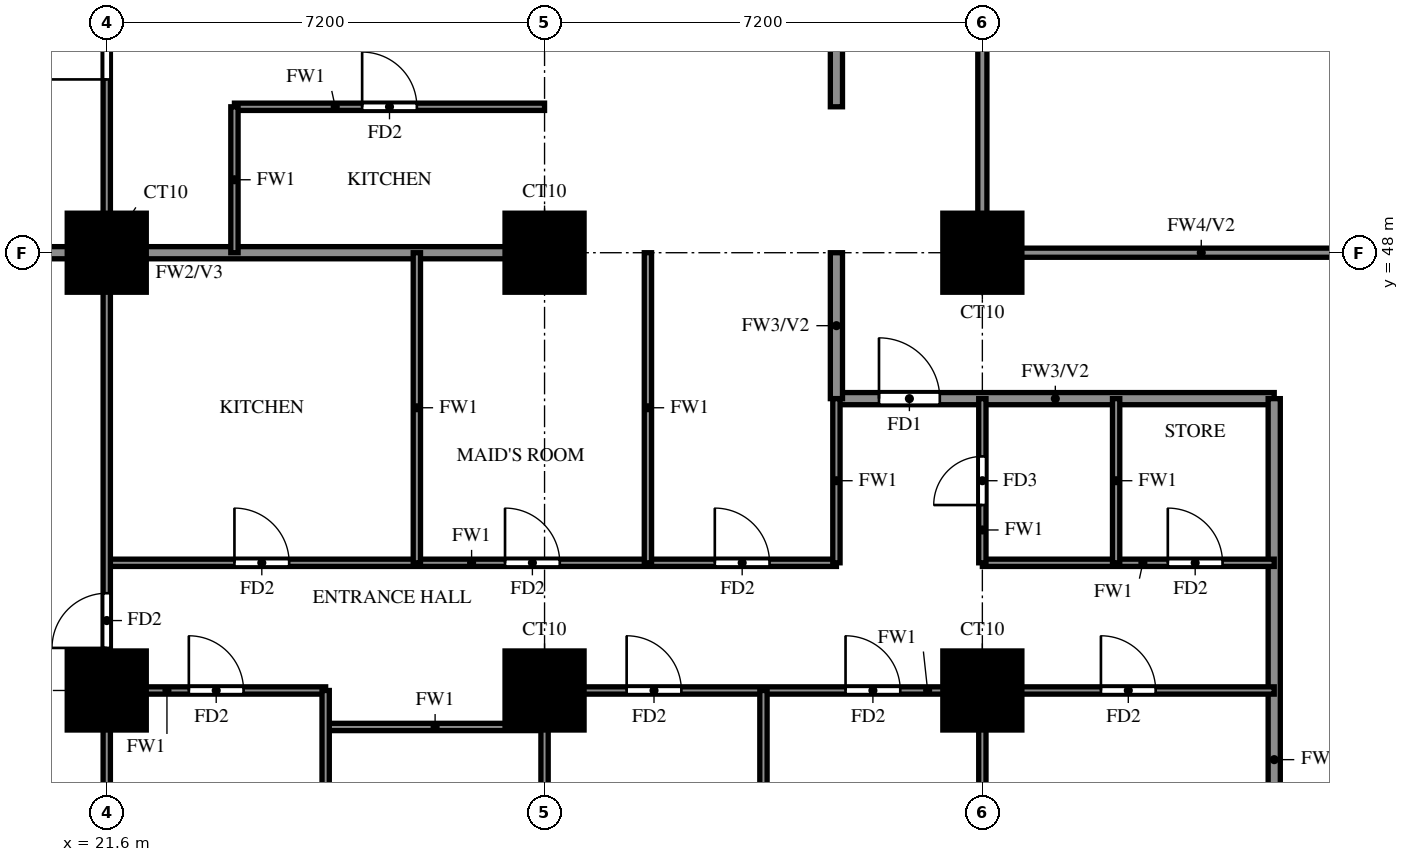
"""IFC4 building model, lengths in metres.
Left out: names, types, materials, properties, quantities, classifications, styles, units other than length and angle.
Written with IfcOpenShell. Run it as: python <this file> out.ifc"""

import sys

from ifc_helpers import new_model, si_unit, direction, frame, frame_2d, origin, origin_2d, place, context, subcontext, project, spatial, rectangle, extrude, source, transform, mapped, element, fill, save


model = new_model("IFC4")
c1 = context("Model", 3, precision=1e-05, world=origin(), true_north=direction((0.0, 1.0)))
c2 = subcontext(c1, "Body", "Model", "MODEL_VIEW")
j1 = project(units=[si_unit("LENGTHUNIT", "METRE"), si_unit("PLANEANGLEUNIT", "RADIAN")], contexts=[c1])
p1 = place(None, origin())
s1 = spatial("IfcSite", under=j1, at=p1, CompositionType="ELEMENT")
p2 = place(p1, origin())
s2 = spatial("IfcBuilding", under=s1, at=p2, CompositionType="ELEMENT")
p3 = place(p2, frame((0.0, 0.0, 79.5)))
s3 = spatial("IfcBuildingStorey", under=s2, at=p3, CompositionType="ELEMENT", Elevation=79.5)
m1 = source(origin(), c2, "Body", "SweptSolid", [
    extrude(rectangle(XDim=1.3, YDim=1.3, at=origin_2d()), origin(), (0.0, 0.0, 1.0), 3.18),
])
for number, where, z_axis, x_axis in (
    (1, (21.6, 40.8, 0.0), (0.0, 0.0, 1.0), (1.0, 0.0, 0.0)),
    (2, (28.8, 40.8, 0.0), (0.0, 0.0, 1.0), (1.0, 0.0, 0.0)),
    (3, (36.0, 40.8, 0.0), (0.0, 0.0, 1.0), (1.0, 0.0, 0.0)),
    (4, (21.6, 48.0, 0.0), (0.0, 0.0, 1.0), (1.0, 0.0, 0.0)),
    (5, (28.8, 48.0, 0.0), (0.0, 0.0, 1.0), (1.0, 0.0, 0.0)),
    (6, (36.0, 48.0, 0.0), (0.0, 0.0, 1.0), (1.0, 0.0, 0.0)),
):
    element("IfcColumn", number, at=place(p3, frame(where, z_axis=z_axis, x_axis=x_axis)), inside=s3, PredefinedType="COLUMN", context=c2, shape_type="MappedRepresentation", body=[
        mapped(m1, transform((0.0, 0.0, 0.0))),
    ])
p4 = place(p3, frame((33.6, 45.6, 0.0), z_axis=(0.0, 0.0, 1.0), x_axis=(1.0, 0.0, 0.0)))
e7 = element("IfcWall", 7, at=p4, inside=s3, PredefinedType="SOLIDWALL", context=c2, shape_type="SweptSolid", body=[
    extrude(rectangle(XDim=7.2, YDim=0.2, at=frame_2d((3.6, 0.0))), origin(), (0.0, 0.0, 1.0), 3.18),
])
p5 = place(p4, frame((0.7, 0.0, 0.0)))
e8 = element("IfcOpeningElement", 8, at=p5, cuts=e7, PredefinedType="OPENING", context=c2, shape_type="SweptSolid", body=[
    extrude(rectangle(XDim=1.0, YDim=2.1, at=frame_2d((0.5, 1.05))), frame((0.0, 0.11, 0.0), z_axis=(0.0, -1.0, 0.0), x_axis=(1.0, 0.0, 0.0)), (0.0, 0.0, 1.0), 0.22),
])
p6 = place(p3, frame((33.6, 45.6, 0.0), z_axis=(0.0, 0.0, 1.0), x_axis=(0.0, 1.0, 0.0)))
e9 = element("IfcWall", 9, at=p6, inside=s3, PredefinedType="SOLIDWALL", context=c2, shape_type="SweptSolid", body=[
    extrude(rectangle(XDim=2.4, YDim=0.2, at=frame_2d((1.2, 0.0))), origin(), (0.0, 0.0, 1.0), 3.18),
])
p7 = place(p3, frame((33.6, 50.4, 0.0), z_axis=(0.0, 0.0, 1.0), x_axis=(0.0, 1.0, 0.0)))
e10 = element("IfcWall", 10, at=p7, inside=s3, PredefinedType="SOLIDWALL", context=c2, shape_type="SweptSolid", body=[
    extrude(rectangle(XDim=9.6, YDim=0.2, at=frame_2d((4.8, 0.0))), origin(), (0.0, 0.0, 1.0), 3.18),
])
p8 = place(p3, frame((40.8, 33.725, 0.0), z_axis=(0.0, 0.0, 1.0), x_axis=(0.0, 1.0, 0.0)))
e11 = element("IfcWall", 11, at=p8, inside=s3, PredefinedType="SOLIDWALL", context=c2, shape_type="SweptSolid", body=[
    extrude(rectangle(XDim=11.875, YDim=0.2, at=frame_2d((5.938, 0.0))), origin(), (0.0, 0.0, 1.0), 2.28),
])
p9 = place(p3, frame((14.525, 48.0, 0.0), z_axis=(0.0, 0.0, 1.0), x_axis=(1.0, 0.0, 0.0)))
e12 = element("IfcWall", 12, at=p9, inside=s3, PredefinedType="SOLIDWALL", context=c2, shape_type="SweptSolid", body=[
    extrude(rectangle(XDim=14.275, YDim=0.2, at=frame_2d((7.138, 0.0))), origin(), (0.0, 0.0, 1.0), 3.18),
])
p10 = place(p3, frame((25.2, 40.2, 0.0), z_axis=(0.0, 0.0, 1.0), x_axis=(1.0, 0.0, 0.0)))
e13 = element("IfcWall", 13, at=p10, inside=s3, PredefinedType="PARTITIONING", context=c2, shape_type="SweptSolid", body=[
    extrude(rectangle(XDim=3.6, YDim=0.12, at=frame_2d((1.8, 0.0))), origin(), (0.0, 0.0, 1.0), 3.18),
])
p11 = place(p3, frame((21.6, 40.8, 0.0), z_axis=(0.0, 0.0, 1.0), x_axis=(1.0, 0.0, 0.0)))
e14 = element("IfcWall", 14, at=p11, inside=s3, PredefinedType="PARTITIONING", context=c2, shape_type="SweptSolid", body=[
    extrude(rectangle(XDim=3.6, YDim=0.12, at=frame_2d((1.8, 0.0))), origin(), (0.0, 0.0, 1.0), 3.18),
])
p12 = place(p11, frame((1.35, 0.0, 0.0)))
e15 = element("IfcOpeningElement", 15, at=p12, cuts=e14, PredefinedType="OPENING", context=c2, shape_type="SweptSolid", body=[
    extrude(rectangle(XDim=0.9, YDim=2.1, at=frame_2d((0.45, 1.05))), frame((0.0, 0.07, 0.0), z_axis=(0.0, -1.0, 0.0), x_axis=(1.0, 0.0, 0.0)), (0.0, 0.0, 1.0), 0.14),
])
p13 = place(p3, frame((28.8, 40.8, 0.0), z_axis=(0.0, 0.0, 1.0), x_axis=(1.0, 0.0, 0.0)))
e16 = element("IfcWall", 16, at=p13, inside=s3, PredefinedType="PARTITIONING", context=c2, shape_type="SweptSolid", body=[
    extrude(rectangle(XDim=12.0, YDim=0.12, at=frame_2d((6.0, 0.0))), origin(), (0.0, 0.0, 1.0), 3.18),
])
p14 = place(p13, frame((1.35, 0.0, 0.0)))
e17 = element("IfcOpeningElement", 17, at=p14, cuts=e16, PredefinedType="OPENING", context=c2, shape_type="SweptSolid", body=[
    extrude(rectangle(XDim=0.9, YDim=2.1, at=frame_2d((0.45, 1.05))), frame((0.0, 0.07, 0.0), z_axis=(0.0, -1.0, 0.0), x_axis=(1.0, 0.0, 0.0)), (0.0, 0.0, 1.0), 0.14),
])
p15 = place(p13, frame((4.95, 0.0, 0.0)))
e18 = element("IfcOpeningElement", 18, at=p15, cuts=e16, PredefinedType="OPENING", context=c2, shape_type="SweptSolid", body=[
    extrude(rectangle(XDim=0.9, YDim=2.1, at=frame_2d((0.45, 1.05))), frame((0.0, 0.07, 0.0), z_axis=(0.0, -1.0, 0.0), x_axis=(1.0, 0.0, 0.0)), (0.0, 0.0, 1.0), 0.14),
])
p16 = place(p13, frame((9.15, 0.0, 0.0)))
e19 = element("IfcOpeningElement", 19, at=p16, cuts=e16, PredefinedType="OPENING", context=c2, shape_type="SweptSolid", body=[
    extrude(rectangle(XDim=0.9, YDim=2.1, at=frame_2d((0.45, 1.05))), frame((0.0, 0.07, 0.0), z_axis=(0.0, -1.0, 0.0), x_axis=(1.0, 0.0, 0.0)), (0.0, 0.0, 1.0), 0.14),
])
p17 = place(p3, frame((21.6, 42.9, 0.0), z_axis=(0.0, 0.0, 1.0), x_axis=(1.0, 0.0, 0.0)))
e20 = element("IfcWall", 20, at=p17, inside=s3, PredefinedType="PARTITIONING", context=c2, shape_type="SweptSolid", body=[
    extrude(rectangle(XDim=12.0, YDim=0.12, at=frame_2d((6.0, 0.0))), origin(), (0.0, 0.0, 1.0), 3.18),
])
p18 = place(p17, frame((2.1, 0.0, 0.0)))
e21 = element("IfcOpeningElement", 21, at=p18, cuts=e20, PredefinedType="OPENING", context=c2, shape_type="SweptSolid", body=[
    extrude(rectangle(XDim=0.9, YDim=2.1, at=frame_2d((0.45, 1.05))), frame((0.0, 0.07, 0.0), z_axis=(0.0, -1.0, 0.0), x_axis=(1.0, 0.0, 0.0)), (0.0, 0.0, 1.0), 0.14),
])
p19 = place(p17, frame((6.55, 0.0, 0.0)))
e22 = element("IfcOpeningElement", 22, at=p19, cuts=e20, PredefinedType="OPENING", context=c2, shape_type="SweptSolid", body=[
    extrude(rectangle(XDim=0.9, YDim=2.1, at=frame_2d((0.45, 1.05))), frame((0.0, 0.07, 0.0), z_axis=(0.0, -1.0, 0.0), x_axis=(1.0, 0.0, 0.0)), (0.0, 0.0, 1.0), 0.14),
])
p20 = place(p17, frame((10.0, 0.0, 0.0)))
e23 = element("IfcOpeningElement", 23, at=p20, cuts=e20, PredefinedType="OPENING", context=c2, shape_type="SweptSolid", body=[
    extrude(rectangle(XDim=0.9, YDim=2.1, at=frame_2d((0.45, 1.05))), frame((0.0, 0.07, 0.0), z_axis=(0.0, -1.0, 0.0), x_axis=(1.0, 0.0, 0.0)), (0.0, 0.0, 1.0), 0.14),
])
p21 = place(p3, frame((36.0, 42.9, 0.0), z_axis=(0.0, 0.0, 1.0), x_axis=(1.0, 0.0, 0.0)))
e24 = element("IfcWall", 24, at=p21, inside=s3, PredefinedType="PARTITIONING", context=c2, shape_type="SweptSolid", body=[
    extrude(rectangle(XDim=4.8, YDim=0.12, at=frame_2d((2.4, 0.0))), origin(), (0.0, 0.0, 1.0), 3.18),
])
p22 = place(p21, frame((3.05, 0.0, 0.0)))
e25 = element("IfcOpeningElement", 25, at=p22, cuts=e24, PredefinedType="OPENING", context=c2, shape_type="SweptSolid", body=[
    extrude(rectangle(XDim=0.9, YDim=2.1, at=frame_2d((0.45, 1.05))), frame((0.0, 0.07, 0.0), z_axis=(0.0, -1.0, 0.0), x_axis=(1.0, 0.0, 0.0)), (0.0, 0.0, 1.0), 0.14),
])
p23 = place(p3, frame((23.7, 50.4, 0.0), z_axis=(0.0, 0.0, 1.0), x_axis=(1.0, 0.0, 0.0)))
e26 = element("IfcWall", 26, at=p23, inside=s3, PredefinedType="PARTITIONING", context=c2, shape_type="SweptSolid", body=[
    extrude(rectangle(XDim=5.1, YDim=0.12, at=frame_2d((2.55, 0.0))), origin(), (0.0, 0.0, 1.0), 3.18),
])
p24 = place(p23, frame((2.1, 0.0, 0.0)))
e27 = element("IfcOpeningElement", 27, at=p24, cuts=e26, PredefinedType="OPENING", context=c2, shape_type="SweptSolid", body=[
    extrude(rectangle(XDim=0.9, YDim=2.1, at=frame_2d((0.45, 1.05))), frame((0.0, 0.07, 0.0), z_axis=(0.0, -1.0, 0.0), x_axis=(1.0, 0.0, 0.0)), (0.0, 0.0, 1.0), 0.14),
])
p25 = place(p3, frame((21.6, 33.725, 0.0), z_axis=(0.0, 0.0, 1.0), x_axis=(0.0, 1.0, 0.0)))
e28 = element("IfcWall", 28, at=p25, inside=s3, PredefinedType="PARTITIONING", context=c2, shape_type="SweptSolid", body=[
    extrude(rectangle(XDim=39.475, YDim=0.12, at=frame_2d((19.737, 0.0))), origin(), (0.0, 0.0, 1.0), 3.18),
])
p26 = place(p25, frame((7.775, 0.0, 0.0)))
e29 = element("IfcOpeningElement", 29, at=p26, cuts=e28, PredefinedType="OPENING", context=c2, shape_type="SweptSolid", body=[
    extrude(rectangle(XDim=0.9, YDim=2.1, at=frame_2d((0.45, 1.05))), frame((0.0, 0.07, 0.0), z_axis=(0.0, -1.0, 0.0), x_axis=(1.0, 0.0, 0.0)), (0.0, 0.0, 1.0), 0.14),
])
p27 = place(p25, frame((17.125, 0.0, 0.0)))
e30 = element("IfcOpeningElement", 30, at=p27, cuts=e28, PredefinedType="OPENING", context=c2, shape_type="SweptSolid", body=[
    extrude(rectangle(XDim=1.5, YDim=2.1, at=frame_2d((0.75, 1.05))), frame((0.0, 0.07, 0.0), z_axis=(0.0, -1.0, 0.0), x_axis=(1.0, 0.0, 0.0)), (0.0, 0.0, 1.0), 0.14),
])
p28 = place(p25, frame((22.825, 0.0, 0.0)))
e31 = element("IfcOpeningElement", 31, at=p28, cuts=e28, PredefinedType="OPENING", context=c2, shape_type="SweptSolid", body=[
    extrude(rectangle(XDim=0.9, YDim=2.1, at=frame_2d((0.45, 1.05))), frame((0.0, 0.07, 0.0), z_axis=(0.0, -1.0, 0.0), x_axis=(1.0, 0.0, 0.0)), (0.0, 0.0, 1.0), 0.14),
])
p29 = place(p25, frame((26.425, 0.0, 0.0)))
e32 = element("IfcOpeningElement", 32, at=p29, cuts=e28, PredefinedType="OPENING", context=c2, shape_type="SweptSolid", body=[
    extrude(rectangle(XDim=0.9, YDim=2.1, at=frame_2d((0.45, 1.05))), frame((0.0, 0.07, 0.0), z_axis=(0.0, -1.0, 0.0), x_axis=(1.0, 0.0, 0.0)), (0.0, 0.0, 1.0), 0.14),
])
p30 = place(p25, frame((30.025, 0.0, 0.0)))
e33 = element("IfcOpeningElement", 33, at=p30, cuts=e28, PredefinedType="OPENING", context=c2, shape_type="SweptSolid", body=[
    extrude(rectangle(XDim=0.9, YDim=2.1, at=frame_2d((0.45, 1.05))), frame((0.0, 0.07, 0.0), z_axis=(0.0, -1.0, 0.0), x_axis=(1.0, 0.0, 0.0)), (0.0, 0.0, 1.0), 0.14),
])
p31 = place(p25, frame((33.625, 0.0, 0.0)))
e34 = element("IfcOpeningElement", 34, at=p31, cuts=e28, PredefinedType="OPENING", context=c2, shape_type="SweptSolid", body=[
    extrude(rectangle(XDim=0.9, YDim=2.1, at=frame_2d((0.45, 1.05))), frame((0.0, 0.07, 0.0), z_axis=(0.0, -1.0, 0.0), x_axis=(1.0, 0.0, 0.0)), (0.0, 0.0, 1.0), 0.14),
])
p32 = place(p25, frame((37.225, 0.0, 0.0)))
e35 = element("IfcOpeningElement", 35, at=p32, cuts=e28, PredefinedType="OPENING", context=c2, shape_type="SweptSolid", body=[
    extrude(rectangle(XDim=0.9, YDim=2.1, at=frame_2d((0.45, 1.05))), frame((0.0, 0.07, 0.0), z_axis=(0.0, -1.0, 0.0), x_axis=(1.0, 0.0, 0.0)), (0.0, 0.0, 1.0), 0.14),
])
p33 = place(p3, frame((23.7, 48.0, 0.0), z_axis=(0.0, 0.0, 1.0), x_axis=(0.0, 1.0, 0.0)))
e36 = element("IfcWall", 36, at=p33, inside=s3, PredefinedType="PARTITIONING", context=c2, shape_type="SweptSolid", body=[
    extrude(rectangle(XDim=2.4, YDim=0.12, at=frame_2d((1.2, 0.0))), origin(), (0.0, 0.0, 1.0), 3.18),
])
p34 = place(p3, frame((25.2, 33.725, 0.0), z_axis=(0.0, 0.0, 1.0), x_axis=(0.0, 1.0, 0.0)))
e37 = element("IfcWall", 37, at=p34, inside=s3, PredefinedType="PARTITIONING", context=c2, shape_type="SweptSolid", body=[
    extrude(rectangle(XDim=7.075, YDim=0.12, at=frame_2d((3.538, 0.0))), origin(), (0.0, 0.0, 1.0), 2.28),
])
p35 = place(p34, frame((2.837, 0.0, 0.0)))
e38 = element("IfcOpeningElement", 38, at=p35, cuts=e37, PredefinedType="OPENING", context=c2, shape_type="SweptSolid", body=[
    extrude(rectangle(XDim=0.8, YDim=2.1, at=frame_2d((0.4, 1.05))), frame((0.0, 0.07, 0.0), z_axis=(0.0, -1.0, 0.0), x_axis=(1.0, 0.0, 0.0)), (0.0, 0.0, 1.0), 0.14),
])
p36 = place(p3, frame((26.7, 42.9, 0.0), z_axis=(0.0, 0.0, 1.0), x_axis=(0.0, 1.0, 0.0)))
e39 = element("IfcWall", 39, at=p36, inside=s3, PredefinedType="PARTITIONING", context=c2, shape_type="SweptSolid", body=[
    extrude(rectangle(XDim=5.1, YDim=0.12, at=frame_2d((2.55, 0.0))), origin(), (0.0, 0.0, 1.0), 3.18),
])
p37 = place(p3, frame((28.8, 33.725, 0.0), z_axis=(0.0, 0.0, 1.0), x_axis=(0.0, 1.0, 0.0)))
e40 = element("IfcWall", 40, at=p37, inside=s3, PredefinedType="PARTITIONING", context=c2, shape_type="SweptSolid", body=[
    extrude(rectangle(XDim=7.075, YDim=0.12, at=frame_2d((3.538, 0.0))), origin(), (0.0, 0.0, 1.0), 3.18),
])
p38 = place(p3, frame((30.5, 42.9, 0.0), z_axis=(0.0, 0.0, 1.0), x_axis=(0.0, 1.0, 0.0)))
e41 = element("IfcWall", 41, at=p38, inside=s3, PredefinedType="PARTITIONING", context=c2, shape_type="SweptSolid", body=[
    extrude(rectangle(XDim=5.1, YDim=0.12, at=frame_2d((2.55, 0.0))), origin(), (0.0, 0.0, 1.0), 3.18),
])
p39 = place(p3, frame((32.4, 33.725, 0.0), z_axis=(0.0, 0.0, 1.0), x_axis=(0.0, 1.0, 0.0)))
e42 = element("IfcWall", 42, at=p39, inside=s3, PredefinedType="PARTITIONING", context=c2, shape_type="SweptSolid", body=[
    extrude(rectangle(XDim=7.075, YDim=0.12, at=frame_2d((3.538, 0.0))), origin(), (0.0, 0.0, 1.0), 2.28),
])
p40 = place(p3, frame((33.6, 42.9, 0.0), z_axis=(0.0, 0.0, 1.0), x_axis=(0.0, 1.0, 0.0)))
e43 = element("IfcWall", 43, at=p40, inside=s3, PredefinedType="PARTITIONING", context=c2, shape_type="SweptSolid", body=[
    extrude(rectangle(XDim=2.7, YDim=0.12, at=frame_2d((1.35, 0.0))), origin(), (0.0, 0.0, 1.0), 3.18),
])
p41 = place(p3, frame((36.0, 33.725, 0.0), z_axis=(0.0, 0.0, 1.0), x_axis=(0.0, 1.0, 0.0)))
e44 = element("IfcWall", 44, at=p41, inside=s3, PredefinedType="PARTITIONING", context=c2, shape_type="SweptSolid", body=[
    extrude(rectangle(XDim=7.075, YDim=0.12, at=frame_2d((3.538, 0.0))), origin(), (0.0, 0.0, 1.0), 3.18),
])
p42 = place(p3, frame((36.0, 42.9, 0.0), z_axis=(0.0, 0.0, 1.0), x_axis=(0.0, 1.0, 0.0)))
e45 = element("IfcWall", 45, at=p42, inside=s3, PredefinedType="PARTITIONING", context=c2, shape_type="SweptSolid", body=[
    extrude(rectangle(XDim=2.7, YDim=0.12, at=frame_2d((1.35, 0.0))), origin(), (0.0, 0.0, 1.0), 3.18),
])
p43 = place(p42, frame((0.95, 0.0, 0.0)))
e46 = element("IfcOpeningElement", 46, at=p43, cuts=e45, PredefinedType="OPENING", context=c2, shape_type="SweptSolid", body=[
    extrude(rectangle(XDim=0.8, YDim=2.1, at=frame_2d((0.4, 1.05))), frame((0.0, 0.07, 0.0), z_axis=(0.0, -1.0, 0.0), x_axis=(1.0, 0.0, 0.0)), (0.0, 0.0, 1.0), 0.14),
])
p44 = place(p3, frame((38.2, 42.9, 0.0), z_axis=(0.0, 0.0, 1.0), x_axis=(0.0, 1.0, 0.0)))
e47 = element("IfcWall", 47, at=p44, inside=s3, PredefinedType="PARTITIONING", context=c2, shape_type="SweptSolid", body=[
    extrude(rectangle(XDim=2.7, YDim=0.12, at=frame_2d((1.35, 0.0))), origin(), (0.0, 0.0, 1.0), 3.18),
])
p45 = place(p3, frame((36.0, 48.0, 0.0), z_axis=(0.0, 0.0, 1.0), x_axis=(1.0, 0.0, 0.0)))
e48 = element("IfcWall", 48, at=p45, inside=s3, PredefinedType="SOLIDWALL", context=c2, shape_type="SweptSolid", body=[
    extrude(rectangle(XDim=7.2, YDim=0.15, at=frame_2d((3.6, 0.0))), origin(), (0.0, 0.0, 1.0), 2.28),
])
p46 = place(p3, frame((36.0, 48.0, 0.0), z_axis=(0.0, 0.0, 1.0), x_axis=(0.0, 1.0, 0.0)))
e49 = element("IfcWall", 49, at=p46, inside=s3, PredefinedType="SOLIDWALL", context=c2, shape_type="SweptSolid", body=[
    extrude(rectangle(XDim=14.4, YDim=0.15, at=frame_2d((7.2, 0.0))), origin(), (0.0, 0.0, 1.0), 2.28),
])
p47 = place(p5, origin())
e50 = element("IfcDoor", 50, at=p47, inside=s3, OperationType="SINGLE_SWING_LEFT", PredefinedType="DOOR", context=c2, shape_type="SweptSolid", body=[
    extrude(rectangle(XDim=1.0, YDim=2.1, at=frame_2d((0.5, 1.05))), frame((0.0, 0.025, 0.0), z_axis=(0.0, -1.0, 0.0), x_axis=(1.0, 0.0, 0.0)), (0.0, 0.0, 1.0), 0.05),
])
fill(e8, e50)
p48 = place(p26, origin())
e51 = element("IfcDoor", 51, at=p48, inside=s3, OperationType="SINGLE_SWING_LEFT", PredefinedType="DOOR", context=c2, shape_type="SweptSolid", body=[
    extrude(rectangle(XDim=0.9, YDim=2.1, at=frame_2d((0.45, 1.05))), frame((0.0, 0.025, 0.0), z_axis=(0.0, -1.0, 0.0), x_axis=(1.0, 0.0, 0.0)), (0.0, 0.0, 1.0), 0.05),
])
fill(e29, e51)
p49 = place(p12, origin())
e52 = element("IfcDoor", 52, at=p49, inside=s3, OperationType="SINGLE_SWING_LEFT", PredefinedType="DOOR", context=c2, shape_type="SweptSolid", body=[
    extrude(rectangle(XDim=0.9, YDim=2.1, at=frame_2d((0.45, 1.05))), frame((0.0, 0.025, 0.0), z_axis=(0.0, -1.0, 0.0), x_axis=(1.0, 0.0, 0.0)), (0.0, 0.0, 1.0), 0.05),
])
fill(e15, e52)
p50 = place(p14, origin())
e53 = element("IfcDoor", 53, at=p50, inside=s3, OperationType="SINGLE_SWING_RIGHT", PredefinedType="DOOR", context=c2, shape_type="SweptSolid", body=[
    extrude(rectangle(XDim=0.9, YDim=2.1, at=frame_2d((0.45, 1.05))), frame((0.0, 0.025, 0.0), z_axis=(0.0, -1.0, 0.0), x_axis=(1.0, 0.0, 0.0)), (0.0, 0.0, 1.0), 0.05),
])
fill(e17, e53)
p51 = place(p15, origin())
e54 = element("IfcDoor", 54, at=p51, inside=s3, OperationType="SINGLE_SWING_LEFT", PredefinedType="DOOR", context=c2, shape_type="SweptSolid", body=[
    extrude(rectangle(XDim=0.9, YDim=2.1, at=frame_2d((0.45, 1.05))), frame((0.0, 0.025, 0.0), z_axis=(0.0, -1.0, 0.0), x_axis=(1.0, 0.0, 0.0)), (0.0, 0.0, 1.0), 0.05),
])
fill(e18, e54)
p52 = place(p16, origin())
e55 = element("IfcDoor", 55, at=p52, inside=s3, OperationType="SINGLE_SWING_LEFT", PredefinedType="DOOR", context=c2, shape_type="SweptSolid", body=[
    extrude(rectangle(XDim=0.9, YDim=2.1, at=frame_2d((0.45, 1.05))), frame((0.0, 0.025, 0.0), z_axis=(0.0, -1.0, 0.0), x_axis=(1.0, 0.0, 0.0)), (0.0, 0.0, 1.0), 0.05),
])
fill(e19, e55)
p53 = place(p18, origin())
e56 = element("IfcDoor", 56, at=p53, inside=s3, OperationType="SINGLE_SWING_RIGHT", PredefinedType="DOOR", context=c2, shape_type="SweptSolid", body=[
    extrude(rectangle(XDim=0.9, YDim=2.1, at=frame_2d((0.45, 1.05))), frame((0.0, 0.025, 0.0), z_axis=(0.0, -1.0, 0.0), x_axis=(1.0, 0.0, 0.0)), (0.0, 0.0, 1.0), 0.05),
])
fill(e21, e56)
p54 = place(p19, origin())
e57 = element("IfcDoor", 57, at=p54, inside=s3, OperationType="SINGLE_SWING_LEFT", PredefinedType="DOOR", context=c2, shape_type="SweptSolid", body=[
    extrude(rectangle(XDim=0.9, YDim=2.1, at=frame_2d((0.45, 1.05))), frame((0.0, 0.025, 0.0), z_axis=(0.0, -1.0, 0.0), x_axis=(1.0, 0.0, 0.0)), (0.0, 0.0, 1.0), 0.05),
])
fill(e22, e57)
p55 = place(p20, origin())
e58 = element("IfcDoor", 58, at=p55, inside=s3, OperationType="SINGLE_SWING_LEFT", PredefinedType="DOOR", context=c2, shape_type="SweptSolid", body=[
    extrude(rectangle(XDim=0.9, YDim=2.1, at=frame_2d((0.45, 1.05))), frame((0.0, 0.025, 0.0), z_axis=(0.0, -1.0, 0.0), x_axis=(1.0, 0.0, 0.0)), (0.0, 0.0, 1.0), 0.05),
])
fill(e23, e58)
p56 = place(p43, origin())
e59 = element("IfcDoor", 59, at=p56, inside=s3, OperationType="SINGLE_SWING_RIGHT", PredefinedType="DOOR", context=c2, shape_type="SweptSolid", body=[
    extrude(rectangle(XDim=0.8, YDim=2.1, at=frame_2d((0.4, 1.05))), frame((0.0, 0.025, 0.0), z_axis=(0.0, -1.0, 0.0), x_axis=(1.0, 0.0, 0.0)), (0.0, 0.0, 1.0), 0.05),
])
fill(e46, e59)
p57 = place(p22, origin())
e60 = element("IfcDoor", 60, at=p57, inside=s3, OperationType="SINGLE_SWING_LEFT", PredefinedType="DOOR", context=c2, shape_type="SweptSolid", body=[
    extrude(rectangle(XDim=0.9, YDim=2.1, at=frame_2d((0.45, 1.05))), frame((0.0, 0.025, 0.0), z_axis=(0.0, -1.0, 0.0), x_axis=(1.0, 0.0, 0.0)), (0.0, 0.0, 1.0), 0.05),
])
fill(e25, e60)
p58 = place(p27, origin())
e61 = element("IfcDoor", 61, at=p58, inside=s3, OperationType="SINGLE_SWING_RIGHT", PredefinedType="DOOR", context=c2, shape_type="SweptSolid", body=[
    extrude(rectangle(XDim=1.5, YDim=2.1, at=frame_2d((0.75, 1.05))), frame((0.0, 0.025, 0.0), z_axis=(0.0, -1.0, 0.0), x_axis=(1.0, 0.0, 0.0)), (0.0, 0.0, 1.0), 0.05),
])
fill(e30, e61)
p59 = place(p24, origin())
e62 = element("IfcDoor", 62, at=p59, inside=s3, OperationType="SINGLE_SWING_RIGHT", PredefinedType="DOOR", context=c2, shape_type="SweptSolid", body=[
    extrude(rectangle(XDim=0.9, YDim=2.1, at=frame_2d((0.45, 1.05))), frame((0.0, 0.025, 0.0), z_axis=(0.0, -1.0, 0.0), x_axis=(1.0, 0.0, 0.0)), (0.0, 0.0, 1.0), 0.05),
])
fill(e27, e62)
save(model, sys.argv[1])
